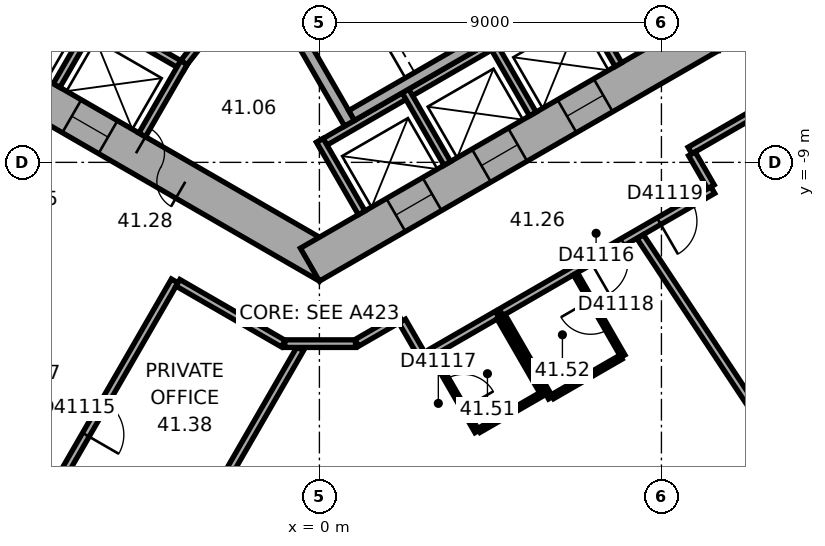
"""IFC4 building model, lengths in metres.
Left out: names, types, materials, properties, quantities, classifications, styles, units other than length and angle.
Written with IfcOpenShell. Run it as: python <this file> out.ifc"""

import sys

from ifc_helpers import new_model, si_unit, direction, frame, frame_2d, origin, place, context, subcontext, project, spatial, rectangle, extrude, element, fill, save


model = new_model("IFC4")
c1 = context("Model", 3, precision=1e-05, world=origin(), true_north=direction((0.0, 1.0)))
c2 = subcontext(c1, "Body", "Model", "MODEL_VIEW")
j1 = project(units=[si_unit("LENGTHUNIT", "METRE"), si_unit("PLANEANGLEUNIT", "RADIAN")], contexts=[c1])
p1 = place(None, origin())
s1 = spatial("IfcSite", under=j1, at=p1, CompositionType="ELEMENT")
p2 = place(p1, origin())
s2 = spatial("IfcBuilding", under=s1, at=p2, CompositionType="ELEMENT")
p3 = place(p2, frame((0.0, 0.0, 168.8)))
s3 = spatial("IfcBuildingStorey", under=s2, at=p3, CompositionType="ELEMENT", Elevation=168.8)
p4 = place(p3, frame((-10.25, -5.629, 0.0), z_axis=(0.0, 0.0, 1.0), x_axis=(0.866022616891, -0.50000482701, 0.0)))
e1 = element("IfcWall", 1, at=p4, inside=s3, PredefinedType="SHEAR", context=c2, shape_type="SweptSolid", body=[
    extrude(rectangle(XDim=12.125, YDim=1.0, at=frame_2d((6.062, 0.0))), origin(), (0.0, 0.0, 1.0), 3.7),
])
p5 = place(p4, frame((6.262, 0.0, 0.0)))
e2 = element("IfcOpeningElement", 2, at=p5, cuts=e1, PredefinedType="OPENING", context=c2, shape_type="SweptSolid", body=[
    extrude(rectangle(XDim=1.5, YDim=2.1, at=frame_2d((0.75, 1.05))), frame((0.0, 0.51, 0.0), z_axis=(0.0, -1.0, 0.0), x_axis=(1.0, 0.0, 0.0)), (0.0, 0.0, 1.0), 1.02),
])
p6 = place(p4, frame((1.712, 0.0, 0.0)))
e3 = element("IfcOpeningElement", 3, at=p6, cuts=e1, PredefinedType="OPENING", context=c2, shape_type="SweptSolid", body=[
    extrude(rectangle(XDim=1.1, YDim=2.1, at=frame_2d((0.55, 1.05))), frame((0.0, 0.51, 0.0), z_axis=(0.0, -1.0, 0.0), x_axis=(1.0, 0.0, 0.0)), (0.0, 0.0, 1.0), 1.02),
])
p7 = place(p4, frame((4.312, 0.0, 0.0)))
e4 = element("IfcOpeningElement", 4, at=p7, cuts=e1, PredefinedType="OPENING", context=c2, shape_type="SweptSolid", body=[
    extrude(rectangle(XDim=1.1, YDim=2.1, at=frame_2d((0.55, 1.05))), frame((0.0, 0.51, 0.0), z_axis=(0.0, -1.0, 0.0), x_axis=(1.0, 0.0, 0.0)), (0.0, 0.0, 1.0), 1.02),
])
p8 = place(p3, frame((-0.25, -11.691, 0.0), z_axis=(0.0, 0.0, 1.0), x_axis=(0.866022616891, 0.50000482701, 0.0)))
e5 = element("IfcWall", 5, at=p8, inside=s3, PredefinedType="SHEAR", context=c2, shape_type="SweptSolid", body=[
    extrude(rectangle(XDim=12.125, YDim=1.0, at=frame_2d((6.062, 0.0))), origin(), (0.0, 0.0, 1.0), 3.7),
])
p9 = place(p8, frame((2.612, 0.0, 0.0)))
e6 = element("IfcOpeningElement", 6, at=p9, cuts=e5, PredefinedType="OPENING", context=c2, shape_type="SweptSolid", body=[
    extrude(rectangle(XDim=1.1, YDim=2.1, at=frame_2d((0.55, 1.05))), frame((0.0, 0.51, 0.0), z_axis=(0.0, -1.0, 0.0), x_axis=(1.0, 0.0, 0.0)), (0.0, 0.0, 1.0), 1.02),
])
p10 = place(p8, frame((5.212, 0.0, 0.0)))
e7 = element("IfcOpeningElement", 7, at=p10, cuts=e5, PredefinedType="OPENING", context=c2, shape_type="SweptSolid", body=[
    extrude(rectangle(XDim=1.1, YDim=2.1, at=frame_2d((0.55, 1.05))), frame((0.0, 0.51, 0.0), z_axis=(0.0, -1.0, 0.0), x_axis=(1.0, 0.0, 0.0)), (0.0, 0.0, 1.0), 1.02),
])
p11 = place(p8, frame((7.812, 0.0, 0.0)))
e8 = element("IfcOpeningElement", 8, at=p11, cuts=e5, PredefinedType="OPENING", context=c2, shape_type="SweptSolid", body=[
    extrude(rectangle(XDim=1.1, YDim=2.1, at=frame_2d((0.55, 1.05))), frame((0.0, 0.51, 0.0), z_axis=(0.0, -1.0, 0.0), x_axis=(1.0, 0.0, 0.0)), (0.0, 0.0, 1.0), 1.02),
])
p12 = place(p3, frame((-18.789, -14.267, 0.0), z_axis=(0.0, 0.0, 1.0), x_axis=(0.866023315909, -0.500003616288, 0.0)))
e9 = element("IfcWall", 9, at=p12, inside=s3, PredefinedType="STANDARD", context=c2, shape_type="SweptSolid", body=[
    extrude(rectangle(XDim=20.044, YDim=0.2, at=frame_2d((10.022, 0.0))), origin(), (0.0, 0.0, 1.0), 3.7),
])
p13 = place(p12, frame((1.314, 0.0, 0.9)))
e10 = element("IfcOpeningElement", 10, at=p13, cuts=e9, PredefinedType="OPENING", context=c2, shape_type="SweptSolid", body=[
    extrude(rectangle(XDim=2.4, YDim=2.0, at=frame_2d((1.2, 1.0))), frame((0.0, 0.11, 0.0), z_axis=(0.0, -1.0, 0.0), x_axis=(1.0, 0.0, 0.0)), (0.0, 0.0, 1.0), 0.22),
])
p14 = place(p12, frame((5.069, 0.0, 0.9)))
e11 = element("IfcOpeningElement", 11, at=p14, cuts=e9, PredefinedType="OPENING", context=c2, shape_type="SweptSolid", body=[
    extrude(rectangle(XDim=2.4, YDim=2.0, at=frame_2d((1.2, 1.0))), frame((0.0, 0.11, 0.0), z_axis=(0.0, -1.0, 0.0), x_axis=(1.0, 0.0, 0.0)), (0.0, 0.0, 1.0), 0.22),
])
p15 = place(p12, frame((8.823, 0.0, 0.9)))
e12 = element("IfcOpeningElement", 12, at=p15, cuts=e9, PredefinedType="OPENING", context=c2, shape_type="SweptSolid", body=[
    extrude(rectangle(XDim=2.4, YDim=2.0, at=frame_2d((1.2, 1.0))), frame((0.0, 0.11, 0.0), z_axis=(0.0, -1.0, 0.0), x_axis=(1.0, 0.0, 0.0)), (0.0, 0.0, 1.0), 0.22),
])
p16 = place(p12, frame((12.577, 0.0, 0.9)))
e13 = element("IfcOpeningElement", 13, at=p16, cuts=e9, PredefinedType="OPENING", context=c2, shape_type="SweptSolid", body=[
    extrude(rectangle(XDim=2.4, YDim=2.0, at=frame_2d((1.2, 1.0))), frame((0.0, 0.11, 0.0), z_axis=(0.0, -1.0, 0.0), x_axis=(1.0, 0.0, 0.0)), (0.0, 0.0, 1.0), 0.22),
])
p17 = place(p12, frame((16.331, 0.0, 0.9)))
e14 = element("IfcOpeningElement", 14, at=p17, cuts=e9, PredefinedType="OPENING", context=c2, shape_type="SweptSolid", body=[
    extrude(rectangle(XDim=2.4, YDim=2.0, at=frame_2d((1.2, 1.0))), frame((0.0, 0.11, 0.0), z_axis=(0.0, -1.0, 0.0), x_axis=(1.0, 0.0, 0.0)), (0.0, 0.0, 1.0), 0.22),
])
p18 = place(p3, frame((2.911, -24.156, 0.0), z_axis=(0.0, 0.0, 1.0), x_axis=(0.833882163564, 0.551942512668, 0.0)))
e15 = element("IfcWall", 15, at=p18, inside=s3, PredefinedType="STANDARD", context=c2, shape_type="SweptSolid", body=[
    extrude(rectangle(XDim=20.044, YDim=0.2, at=frame_2d((10.022, 0.0))), origin(), (0.0, 0.0, 1.0), 3.7),
])
p19 = place(p18, frame((1.313, 0.0, 0.9)))
e16 = element("IfcOpeningElement", 16, at=p19, cuts=e15, PredefinedType="OPENING", context=c2, shape_type="SweptSolid", body=[
    extrude(rectangle(XDim=2.4, YDim=2.0, at=frame_2d((1.2, 1.0))), frame((0.0, 0.11, 0.0), z_axis=(0.0, -1.0, 0.0), x_axis=(1.0, 0.0, 0.0)), (0.0, 0.0, 1.0), 0.22),
])
p20 = place(p18, frame((5.067, 0.0, 0.9)))
e17 = element("IfcOpeningElement", 17, at=p20, cuts=e15, PredefinedType="OPENING", context=c2, shape_type="SweptSolid", body=[
    extrude(rectangle(XDim=2.4, YDim=2.0, at=frame_2d((1.2, 1.0))), frame((0.0, 0.11, 0.0), z_axis=(0.0, -1.0, 0.0), x_axis=(1.0, 0.0, 0.0)), (0.0, 0.0, 1.0), 0.22),
])
p21 = place(p18, frame((8.821, 0.0, 0.9)))
e18 = element("IfcOpeningElement", 18, at=p21, cuts=e15, PredefinedType="OPENING", context=c2, shape_type="SweptSolid", body=[
    extrude(rectangle(XDim=2.4, YDim=2.0, at=frame_2d((1.2, 1.0))), frame((0.0, 0.11, 0.0), z_axis=(0.0, -1.0, 0.0), x_axis=(1.0, 0.0, 0.0)), (0.0, 0.0, 1.0), 0.22),
])
p22 = place(p18, frame((12.575, 0.0, 0.9)))
e19 = element("IfcOpeningElement", 19, at=p22, cuts=e15, PredefinedType="OPENING", context=c2, shape_type="SweptSolid", body=[
    extrude(rectangle(XDim=2.4, YDim=2.0, at=frame_2d((1.2, 1.0))), frame((0.0, 0.11, 0.0), z_axis=(0.0, -1.0, 0.0), x_axis=(1.0, 0.0, 0.0)), (0.0, 0.0, 1.0), 0.22),
])
p23 = place(p18, frame((16.329, 0.0, 0.9)))
e20 = element("IfcOpeningElement", 20, at=p23, cuts=e15, PredefinedType="OPENING", context=c2, shape_type="SweptSolid", body=[
    extrude(rectangle(XDim=2.4, YDim=2.0, at=frame_2d((1.2, 1.0))), frame((0.0, 0.11, 0.0), z_axis=(0.0, -1.0, 0.0), x_axis=(1.0, 0.0, 0.0)), (0.0, 0.0, 1.0), 0.22),
])
p24 = place(p3, frame((-8.203, -3.809, 0.0), z_axis=(0.0, 0.0, 1.0), x_axis=(0.866028230842, -0.499995103361, 0.0)))
e21 = element("IfcWall", 21, at=p24, inside=s3, PredefinedType="PARTITIONING", context=c2, shape_type="SweptSolid", body=[
    extrude(rectangle(XDim=5.4, YDim=0.2, at=frame_2d((2.7, 0.0))), origin(), (0.0, 0.0, 1.0), 3.42),
])
p25 = place(p3, frame((-5.815, -5.072, 0.0), z_axis=(0.0, 0.0, 1.0), x_axis=(-0.499946605688, -0.86605622881, 0.0)))
e22 = element("IfcWall", 22, at=p25, inside=s3, PredefinedType="PARTITIONING", context=c2, shape_type="SweptSolid", body=[
    extrude(rectangle(XDim=2.2, YDim=0.2, at=frame_2d((1.1, 0.0))), origin(), (0.0, 0.0, 1.0), 3.42),
])
p26 = place(p3, frame((-3.563, -6.372, 0.0), z_axis=(0.0, 0.0, 1.0), x_axis=(-0.499994660107, -0.866028486751, 0.0)))
e23 = element("IfcWall", 23, at=p26, inside=s3, PredefinedType="PARTITIONING", context=c2, shape_type="SweptSolid", body=[
    extrude(rectangle(XDim=2.2, YDim=0.2, at=frame_2d((1.1, 0.0))), origin(), (0.0, 0.0, 1.0), 3.42),
])
p27 = place(p3, frame((-0.024, -8.559, 0.0), z_axis=(0.0, 0.0, 1.0), x_axis=(0.866026010844, 0.49999894854, 0.0)))
e24 = element("IfcWall", 24, at=p27, inside=s3, PredefinedType="PARTITIONING", context=c2, shape_type="SweptSolid", body=[
    extrude(rectangle(XDim=8.0, YDim=0.2, at=frame_2d((4.0, 0.0))), origin(), (0.0, 0.0, 1.0), 3.42),
])
for number, where, z_axis, x_axis in (
    (25, (0.013, -8.422, 0.0), (0.0, 0.0, 1.0), (0.5, -0.866, 0.0)),
    (26, (2.264, -7.122, 0.0), (0.0, 0.0, 1.0), (0.5, -0.866, 0.0)),
    (27, (4.516, -5.822, 0.0), (0.0, 0.0, 1.0), (0.5, -0.866, 0.0)),
    (28, (6.768, -4.522, 0.0), (0.0, 0.0, 1.0), (0.5, -0.866, 0.0)),
):
    element("IfcWall", number, at=place(p3, frame(where, z_axis=z_axis, x_axis=x_axis)), inside=s3, PredefinedType="PARTITIONING", context=c2, shape_type="SweptSolid", body=[
        extrude(rectangle(XDim=2.2, YDim=0.2, at=frame_2d((1.1, 0.0))), origin(), (0.0, 0.0, 1.0), 3.42),
    ])
p28 = place(p3, frame((-1.558, -3.902, 0.0), z_axis=(0.0, 0.0, 1.0), x_axis=(0.499977259774, -0.866038532462, 0.0)))
e29 = element("IfcWall", 29, at=p28, inside=s3, PredefinedType="SHEAR", context=c2, shape_type="SweptSolid", body=[
    extrude(rectangle(XDim=4.7, YDim=0.3, at=frame_2d((2.35, 0.0))), origin(), (0.0, 0.0, 1.0), 3.42),
])
p29 = place(p28, frame((0.8, 0.0, 0.0)))
e30 = element("IfcOpeningElement", 30, at=p29, cuts=e29, PredefinedType="OPENING", context=c2, shape_type="SweptSolid", body=[
    extrude(rectangle(XDim=1.2, YDim=2.1, at=frame_2d((0.6, 1.05))), frame((0.0, 0.16, 0.0), z_axis=(0.0, -1.0, 0.0), x_axis=(1.0, 0.0, 0.0)), (0.0, 0.0, 1.0), 0.32),
])
p30 = place(p3, frame((0.847, -7.767, 0.0), z_axis=(0.0, 0.0, 1.0), x_axis=(0.866027801685, 0.499995846692, 0.0)))
e31 = element("IfcWall", 31, at=p30, inside=s3, PredefinedType="SHEAR", context=c2, shape_type="SweptSolid", body=[
    extrude(rectangle(XDim=7.06, YDim=0.3, at=frame_2d((3.53, 0.0))), origin(), (0.0, 0.0, 1.0), 3.42),
])
p31 = place(p3, frame((-1.712, -4.008, 0.0), z_axis=(0.0, 0.0, 1.0), x_axis=(-0.616549420702, -0.787316208287, 0.0)))
e32 = element("IfcWall", 32, at=p31, inside=s3, PredefinedType="PARTITIONING", context=c2, shape_type="SweptSolid", body=[
    extrude(rectangle(XDim=3.002, YDim=0.2, at=frame_2d((1.501, 0.0))), origin(), (0.0, 0.0, 1.0), 3.42),
])
p32 = place(p3, frame((-7.984, -19.351, 0.0), z_axis=(0.0, 0.0, 1.0), x_axis=(0.500010139422, 0.866019549707, 0.0)))
e33 = element("IfcWall", 33, at=p32, inside=s3, PredefinedType="PARTITIONING", context=c2, shape_type="SweptSolid", body=[
    extrude(rectangle(XDim=8.35, YDim=0.2, at=frame_2d((4.175, 0.0))), origin(), (0.0, 0.0, 1.0), 3.42),
])
p33 = place(p32, frame((3.675, 0.0, 0.0)))
e34 = element("IfcOpeningElement", 34, at=p33, cuts=e33, PredefinedType="OPENING", context=c2, shape_type="SweptSolid", body=[
    extrude(rectangle(XDim=1.0, YDim=2.1, at=frame_2d((0.5, 1.05))), frame((0.0, 0.11, 0.0), z_axis=(0.0, -1.0, 0.0), x_axis=(1.0, 0.0, 0.0)), (0.0, 0.0, 1.0), 0.22),
])
p34 = place(p3, frame((-4.732, -21.228, 0.0), z_axis=(0.0, 0.0, 1.0), x_axis=(0.500000843414, 0.866024916838, 0.0)))
e35 = element("IfcWall", 35, at=p34, inside=s3, PredefinedType="PARTITIONING", context=c2, shape_type="SweptSolid", body=[
    extrude(rectangle(XDim=8.452, YDim=0.2, at=frame_2d((4.226, 0.0))), origin(), (0.0, 0.0, 1.0), 3.42),
])
p35 = place(p3, frame((-3.722, -12.169, 0.0), z_axis=(0.0, 0.0, 1.0), x_axis=(0.866033163891, -0.499986558861, 0.0)))
e36 = element("IfcWall", 36, at=p35, inside=s3, PredefinedType="PARTITIONING", context=c2, shape_type="SweptSolid", body=[
    extrude(rectangle(XDim=3.201, YDim=0.2, at=frame_2d((1.6, 0.0))), origin(), (0.0, 0.0, 1.0), 3.42),
])
p36 = place(p3, frame((-0.91, -13.77, 0.0), z_axis=(0.0, 0.0, 1.0), x_axis=(1.0, 0.0, 0.0)))
e37 = element("IfcWall", 37, at=p36, inside=s3, PredefinedType="PARTITIONING", context=c2, shape_type="SweptSolid", body=[
    extrude(rectangle(XDim=1.86, YDim=0.2, at=frame_2d((0.93, 0.0))), origin(), (0.0, 0.0, 1.0), 3.42),
])
p37 = place(p3, frame((0.985, -13.75, 0.0), z_axis=(0.0, 0.0, 1.0), x_axis=(0.866028661061, 0.499994358189, 0.0)))
e38 = element("IfcWall", 38, at=p37, inside=s3, PredefinedType="PARTITIONING", context=c2, shape_type="SweptSolid", body=[
    extrude(rectangle(XDim=1.321, YDim=0.2, at=frame_2d((0.661, 0.0))), origin(), (0.0, 0.0, 1.0), 3.42),
])
p38 = place(p3, frame((2.179, -13.176, 0.0), z_axis=(0.0, 0.0, 1.0), x_axis=(0.499978356969, -0.866037899034, 0.0)))
e39 = element("IfcWall", 39, at=p38, inside=s3, PredefinedType="PARTITIONING", context=c2, shape_type="SweptSolid", body=[
    extrude(rectangle(XDim=1.101, YDim=0.2, at=frame_2d((0.551, 0.0))), origin(), (0.0, 0.0, 1.0), 3.42),
])
p39 = place(p3, frame((2.946, -14.004, 0.0), z_axis=(0.0, 0.0, 1.0), x_axis=(0.866041268327, 0.499972520799, 0.0)))
e40 = element("IfcWall", 40, at=p39, inside=s3, PredefinedType="PARTITIONING", context=c2, shape_type="SweptSolid", body=[
    extrude(rectangle(XDim=2.0, YDim=0.2, at=frame_2d((1.0, 0.0))), origin(), (0.0, 0.0, 1.0), 3.42),
])
p40 = place(p3, frame((4.146, -16.083, 0.0), z_axis=(0.0, 0.0, 1.0), x_axis=(-0.499952165731, 0.866053019151, 0.0)))
e41 = element("IfcWall", 41, at=p40, inside=s3, PredefinedType="PARTITIONING", context=c2, shape_type="SweptSolid", body=[
    extrude(rectangle(XDim=2.3, YDim=0.12, at=frame_2d((1.15, 0.0))), origin(), (0.0, 0.0, 1.0), 3.42),
])
p41 = place(p40, frame((0.7, 0.0, 0.0)))
e42 = element("IfcOpeningElement", 42, at=p41, cuts=e41, PredefinedType="OPENING", context=c2, shape_type="SweptSolid", body=[
    extrude(rectangle(XDim=0.9, YDim=2.1, at=frame_2d((0.45, 1.05))), frame((0.0, 0.07, 0.0), z_axis=(0.0, -1.0, 0.0), x_axis=(1.0, 0.0, 0.0)), (0.0, 0.0, 1.0), 0.14),
])
p42 = place(p3, frame((4.728, -13.091, 0.0), z_axis=(0.0, 0.0, 1.0), x_axis=(0.500031774688, -0.866007057882, 0.0)))
e43 = element("IfcWall", 43, at=p42, inside=s3, PredefinedType="PARTITIONING", context=c2, shape_type="SweptSolid", body=[
    extrude(rectangle(XDim=2.3, YDim=0.12, at=frame_2d((1.15, 0.0))), origin(), (0.0, 0.0, 1.0), 3.42),
])
p43 = place(p3, frame((4.782, -12.944, 0.0), z_axis=(0.0, 0.0, 1.0), x_axis=(0.866022506829, 0.50000501764, 0.0)))
e44 = element("IfcWall", 44, at=p43, inside=s3, PredefinedType="PARTITIONING", context=c2, shape_type="SweptSolid", body=[
    extrude(rectangle(XDim=6.432, YDim=0.2, at=frame_2d((3.216, 0.0))), origin(), (0.0, 0.0, 1.0), 3.42),
])
p44 = place(p43, frame((2.704, 0.0, 0.0)))
e45 = element("IfcOpeningElement", 45, at=p44, cuts=e44, PredefinedType="OPENING", context=c2, shape_type="SweptSolid", body=[
    extrude(rectangle(XDim=1.0, YDim=2.1, at=frame_2d((0.5, 1.05))), frame((0.0, 0.11, 0.0), z_axis=(0.0, -1.0, 0.0), x_axis=(1.0, 0.0, 0.0)), (0.0, 0.0, 1.0), 0.22),
])
p45 = place(p43, frame((4.795, 0.0, 0.0)))
e46 = element("IfcOpeningElement", 46, at=p45, cuts=e44, PredefinedType="OPENING", context=c2, shape_type="SweptSolid", body=[
    extrude(rectangle(XDim=1.0, YDim=2.1, at=frame_2d((0.5, 1.05))), frame((0.0, 0.11, 0.0), z_axis=(0.0, -1.0, 0.0), x_axis=(1.0, 0.0, 0.0)), (0.0, 0.0, 1.0), 0.22),
])
p46 = place(p3, frame((5.826, -15.113, 0.0), z_axis=(0.0, 0.0, 1.0), x_axis=(-0.866045024864, -0.499966013754, 0.0)))
e47 = element("IfcWall", 47, at=p46, inside=s3, PredefinedType="PARTITIONING", context=c2, shape_type="SweptSolid", body=[
    extrude(rectangle(XDim=1.88, YDim=0.12, at=frame_2d((0.94, 0.0))), origin(), (0.0, 0.0, 1.0), 3.42),
])
p47 = place(p3, frame((6.082, -15.196, 0.0), z_axis=(0.0, 0.0, 1.0), x_axis=(-0.500004234368, 0.866022959057, 0.0)))
e48 = element("IfcWall", 48, at=p47, inside=s3, PredefinedType="PARTITIONING", context=c2, shape_type="SweptSolid", body=[
    extrude(rectangle(XDim=2.5, YDim=0.12, at=frame_2d((1.25, 0.0))), origin(), (0.0, 0.0, 1.0), 3.42),
])
p48 = place(p3, frame((6.737, -11.931, 0.0), z_axis=(0.0, 0.0, 1.0), x_axis=(0.500004234368, -0.866022959057, 0.0)))
e49 = element("IfcWall", 49, at=p48, inside=s3, PredefinedType="PARTITIONING", context=c2, shape_type="SweptSolid", body=[
    extrude(rectangle(XDim=2.5, YDim=0.12, at=frame_2d((1.25, 0.0))), origin(), (0.0, 0.0, 1.0), 3.42),
])
p49 = place(p48, frame((0.8, 0.0, 0.0)))
e50 = element("IfcOpeningElement", 50, at=p49, cuts=e49, PredefinedType="OPENING", context=c2, shape_type="SweptSolid", body=[
    extrude(rectangle(XDim=0.9, YDim=2.1, at=frame_2d((0.45, 1.05))), frame((0.0, 0.07, 0.0), z_axis=(0.0, -1.0, 0.0), x_axis=(1.0, 0.0, 0.0)), (0.0, 0.0, 1.0), 0.14),
])
p50 = place(p3, frame((7.935, -14.126, 0.0), z_axis=(0.0, 0.0, 1.0), x_axis=(-0.866009661879, -0.500027264788, 0.0)))
e51 = element("IfcWall", 51, at=p50, inside=s3, PredefinedType="PARTITIONING", context=c2, shape_type="SweptSolid", body=[
    extrude(rectangle(XDim=2.08, YDim=0.12, at=frame_2d((1.04, 0.0))), origin(), (0.0, 0.0, 1.0), 3.42),
])
p51 = place(p3, frame((9.752, -8.688, 0.0), z_axis=(0.0, 0.0, 1.0), x_axis=(0.865974105138, 0.500088841337, 0.0)))
e52 = element("IfcWall", 52, at=p51, inside=s3, PredefinedType="PARTITIONING", context=c2, shape_type="SweptSolid", body=[
    extrude(rectangle(XDim=1.961, YDim=0.2, at=frame_2d((0.98, 0.0))), origin(), (0.0, 0.0, 1.0), 3.42),
])
p52 = place(p3, frame((10.302, -9.642, 0.0), z_axis=(0.0, 0.0, 1.0), x_axis=(-0.500074377092, 0.865982457891, 0.0)))
e53 = element("IfcWall", 53, at=p52, inside=s3, PredefinedType="PARTITIONING", context=c2, shape_type="SweptSolid", body=[
    extrude(rectangle(XDim=1.001, YDim=0.2, at=frame_2d((0.5, 0.0))), origin(), (0.0, 0.0, 1.0), 3.42),
])
p53 = place(p3, frame((12.281, -16.755, 0.0), z_axis=(0.0, 0.0, 1.0), x_axis=(-0.551925794663, 0.833893228888, 0.0)))
e54 = element("IfcWall", 54, at=p53, inside=s3, PredefinedType="PARTITIONING", context=c2, shape_type="SweptSolid", body=[
    extrude(rectangle(XDim=6.953, YDim=0.2, at=frame_2d((3.476, 0.0))), origin(), (0.0, 0.0, 1.0), 3.42),
])
p54 = place(p5, origin())
e55 = element("IfcDoor", 55, at=p54, inside=s3, OperationType="DOUBLE_DOOR_SINGLE_SWING", PredefinedType="DOOR", context=c2, shape_type="SweptSolid", body=[
    extrude(rectangle(XDim=1.5, YDim=2.1, at=frame_2d((0.75, 1.05))), frame((0.0, 0.025, 0.0), z_axis=(0.0, -1.0, 0.0), x_axis=(1.0, 0.0, 0.0)), (0.0, 0.0, 1.0), 0.05),
])
fill(e2, e55)
p55 = place(p7, origin())
e56 = element("IfcDoor", 56, at=p55, inside=s3, OperationType="DOUBLE_DOOR_SLIDING", PredefinedType="DOOR", context=c2, shape_type="SweptSolid", body=[
    extrude(rectangle(XDim=1.1, YDim=2.1, at=frame_2d((0.55, 1.05))), frame((0.0, 0.025, 0.0), z_axis=(0.0, -1.0, 0.0), x_axis=(1.0, 0.0, 0.0)), (0.0, 0.0, 1.0), 0.05),
])
fill(e4, e56)
p56 = place(p9, origin())
e57 = element("IfcDoor", 57, at=p56, inside=s3, OperationType="DOUBLE_DOOR_SLIDING", PredefinedType="DOOR", context=c2, shape_type="SweptSolid", body=[
    extrude(rectangle(XDim=1.1, YDim=2.1, at=frame_2d((0.55, 1.05))), frame((0.0, 0.025, 0.0), z_axis=(0.0, -1.0, 0.0), x_axis=(1.0, 0.0, 0.0)), (0.0, 0.0, 1.0), 0.05),
])
fill(e6, e57)
p57 = place(p10, origin())
e58 = element("IfcDoor", 58, at=p57, inside=s3, OperationType="DOUBLE_DOOR_SLIDING", PredefinedType="DOOR", context=c2, shape_type="SweptSolid", body=[
    extrude(rectangle(XDim=1.1, YDim=2.1, at=frame_2d((0.55, 1.05))), frame((0.0, 0.025, 0.0), z_axis=(0.0, -1.0, 0.0), x_axis=(1.0, 0.0, 0.0)), (0.0, 0.0, 1.0), 0.05),
])
fill(e7, e58)
p58 = place(p11, origin())
e59 = element("IfcDoor", 59, at=p58, inside=s3, OperationType="DOUBLE_DOOR_SLIDING", PredefinedType="DOOR", context=c2, shape_type="SweptSolid", body=[
    extrude(rectangle(XDim=1.1, YDim=2.1, at=frame_2d((0.55, 1.05))), frame((0.0, 0.025, 0.0), z_axis=(0.0, -1.0, 0.0), x_axis=(1.0, 0.0, 0.0)), (0.0, 0.0, 1.0), 0.05),
])
fill(e8, e59)
p59 = place(p33, origin())
e60 = element("IfcDoor", 60, at=p59, inside=s3, OperationType="SINGLE_SWING_LEFT", PredefinedType="DOOR", context=c2, shape_type="SweptSolid", body=[
    extrude(rectangle(XDim=1.0, YDim=2.1, at=frame_2d((0.5, 1.05))), frame((0.0, 0.025, 0.0), z_axis=(0.0, -1.0, 0.0), x_axis=(1.0, 0.0, 0.0)), (0.0, 0.0, 1.0), 0.05),
])
fill(e34, e60)
p60 = place(p44, origin())
e61 = element("IfcDoor", 61, at=p60, inside=s3, OperationType="SINGLE_SWING_LEFT", PredefinedType="DOOR", context=c2, shape_type="SweptSolid", body=[
    extrude(rectangle(XDim=1.0, YDim=2.1, at=frame_2d((0.5, 1.05))), frame((0.0, 0.025, 0.0), z_axis=(0.0, -1.0, 0.0), x_axis=(1.0, 0.0, 0.0)), (0.0, 0.0, 1.0), 0.05),
])
fill(e45, e61)
p61 = place(p41, origin())
e62 = element("IfcDoor", 62, at=p61, inside=s3, OperationType="SINGLE_SWING_LEFT", PredefinedType="DOOR", context=c2, shape_type="SweptSolid", body=[
    extrude(rectangle(XDim=0.9, YDim=2.1, at=frame_2d((0.45, 1.05))), frame((0.0, 0.025, 0.0), z_axis=(0.0, -1.0, 0.0), x_axis=(1.0, 0.0, 0.0)), (0.0, 0.0, 1.0), 0.05),
])
fill(e42, e62)
p62 = place(p49, origin())
e63 = element("IfcDoor", 63, at=p62, inside=s3, OperationType="SINGLE_SWING_LEFT", PredefinedType="DOOR", context=c2, shape_type="SweptSolid", body=[
    extrude(rectangle(XDim=0.9, YDim=2.1, at=frame_2d((0.45, 1.05))), frame((0.0, 0.025, 0.0), z_axis=(0.0, -1.0, 0.0), x_axis=(1.0, 0.0, 0.0)), (0.0, 0.0, 1.0), 0.05),
])
fill(e50, e63)
p63 = place(p45, origin())
e64 = element("IfcDoor", 64, at=p63, inside=s3, OperationType="SINGLE_SWING_LEFT", PredefinedType="DOOR", context=c2, shape_type="SweptSolid", body=[
    extrude(rectangle(XDim=1.0, YDim=2.1, at=frame_2d((0.5, 1.05))), frame((0.0, 0.025, 0.0), z_axis=(0.0, -1.0, 0.0), x_axis=(1.0, 0.0, 0.0)), (0.0, 0.0, 1.0), 0.05),
])
fill(e46, e64)
save(model, sys.argv[1])
